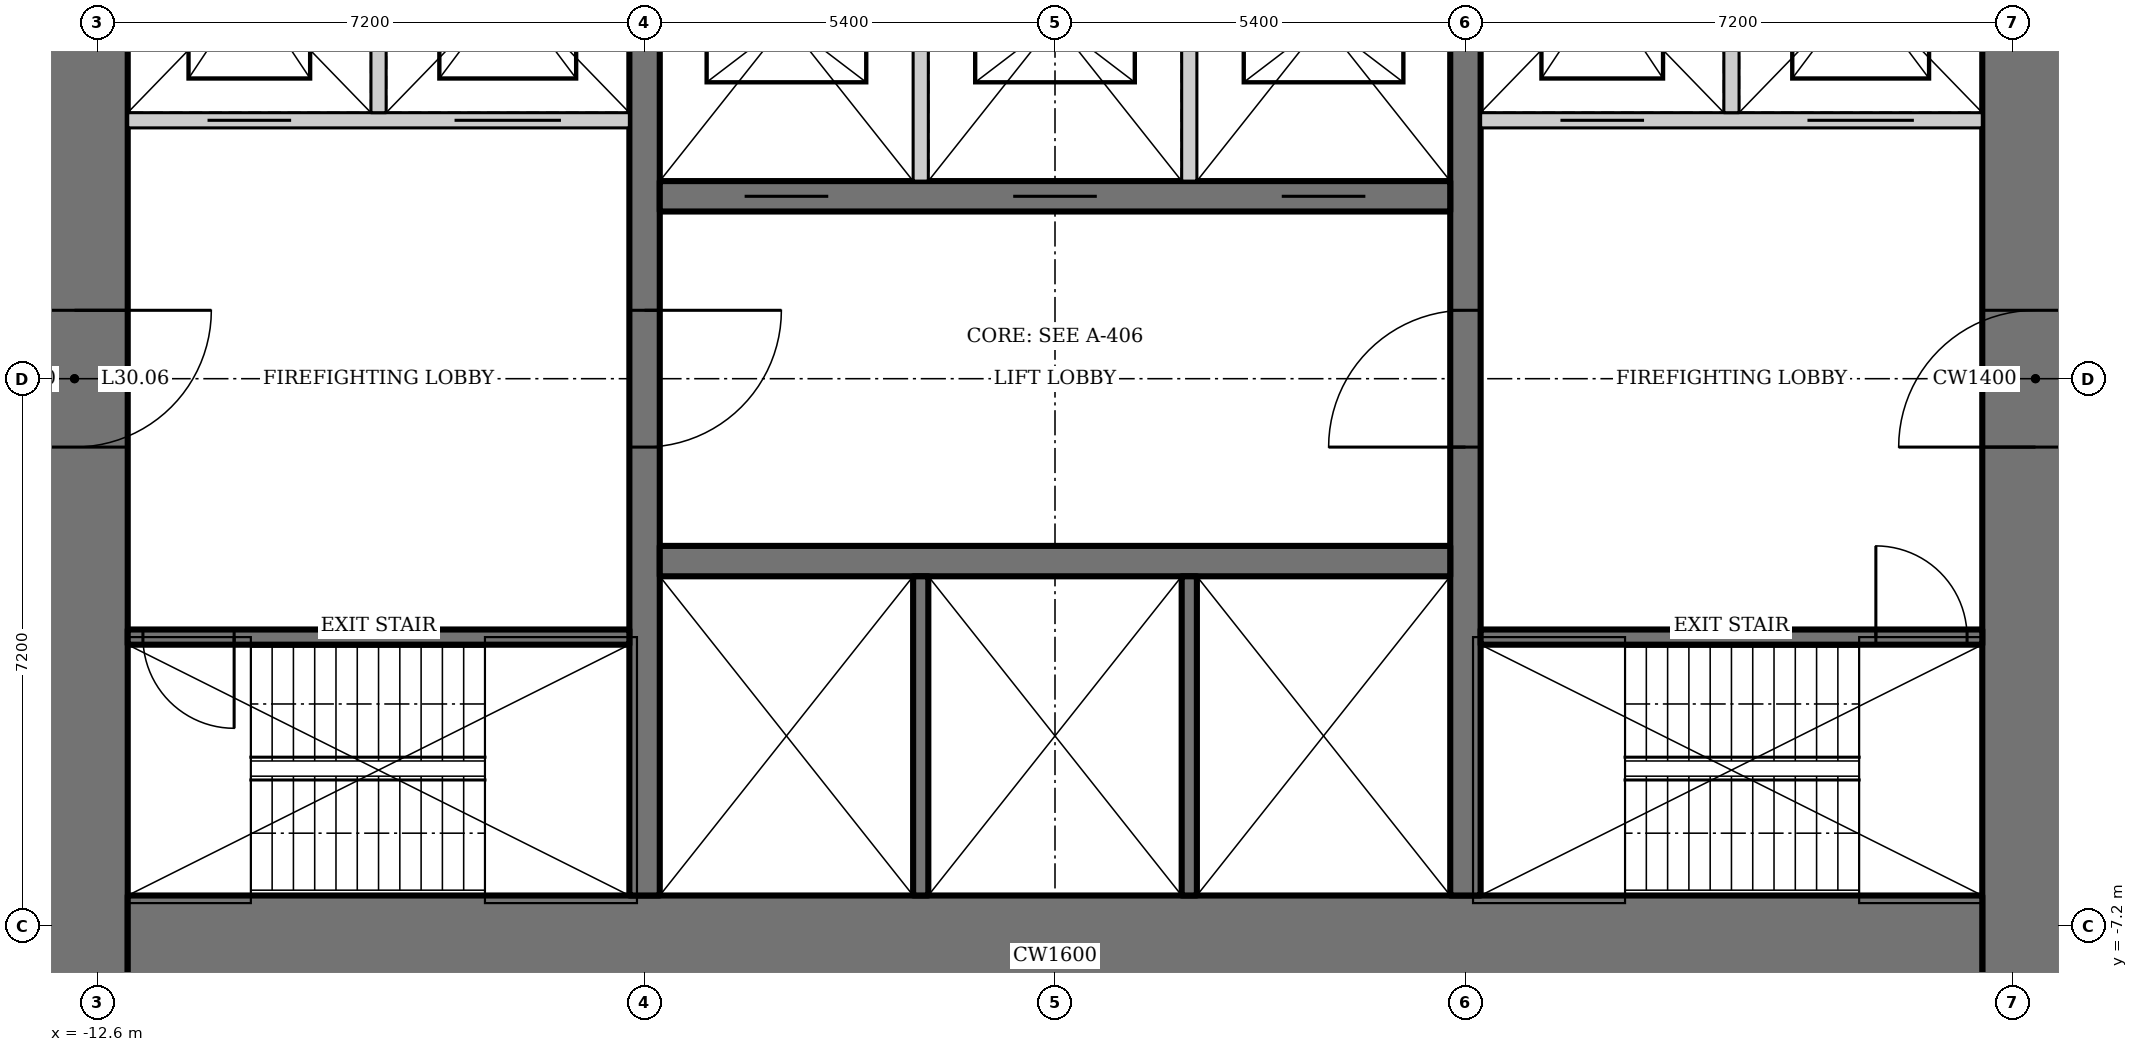
"""IFC4 building model, lengths in metres.
Left out: names, types, materials, properties, quantities, classifications, styles, units other than length and angle.
Written with IfcOpenShell. Run it as: python <this file> out.ifc"""

import sys

from ifc_helpers import new_model, si_unit, direction, frame, frame_2d, origin, place, context, subcontext, project, spatial, rectangle, extrude, element, fill, save


model = new_model("IFC4")
c1 = context("Model", 3, precision=1e-05, world=origin(), true_north=direction((0.0, 1.0)))
c2 = subcontext(c1, "Body", "Model", "MODEL_VIEW")
j1 = project(units=[si_unit("LENGTHUNIT", "METRE"), si_unit("PLANEANGLEUNIT", "RADIAN")], contexts=[c1])
p1 = place(None, origin())
s1 = spatial("IfcSite", under=j1, at=p1, CompositionType="ELEMENT")
p2 = place(p1, origin())
s2 = spatial("IfcBuilding", under=s1, at=p2, CompositionType="ELEMENT")
p3 = place(p2, frame((0.0, 0.0, 130.0)))
s3 = spatial("IfcBuildingStorey", under=s2, at=p3, CompositionType="ELEMENT", Elevation=130.0)
p4 = place(p3, frame((12.9, -13.0, 0.0), z_axis=(0.0, 0.0, 1.0), x_axis=(0.0, 1.0, 0.0)))
e1 = element("IfcWall", 1, at=p4, inside=s3, PredefinedType="SHEAR", context=c2, shape_type="SweptSolid", body=[
    extrude(rectangle(XDim=26.0, YDim=1.4, at=frame_2d((13.0, 0.0))), origin(), (0.0, 0.0, 1.0), 4.2),
])
p5 = place(p4, frame((12.1, 0.0, 0.0)))
e2 = element("IfcOpeningElement", 2, at=p5, cuts=e1, PredefinedType="OPENING", context=c2, shape_type="SweptSolid", body=[
    extrude(rectangle(XDim=1.8, YDim=2.1, at=frame_2d((0.9, 1.05))), frame((0.0, 0.71, 0.0), z_axis=(0.0, -1.0, 0.0), x_axis=(1.0, 0.0, 0.0)), (0.0, 0.0, 1.0), 1.42),
])
p6 = place(p3, frame((-12.9, 13.0, 0.0), z_axis=(0.0, 0.0, 1.0), x_axis=(0.0, -1.0, 0.0)))
e3 = element("IfcWall", 3, at=p6, inside=s3, PredefinedType="SHEAR", context=c2, shape_type="SweptSolid", body=[
    extrude(rectangle(XDim=26.0, YDim=1.4, at=frame_2d((13.0, 0.0))), origin(), (0.0, 0.0, 1.0), 4.2),
])
p7 = place(p6, frame((12.1, 0.0, 0.0)))
e4 = element("IfcOpeningElement", 4, at=p7, cuts=e3, PredefinedType="OPENING", context=c2, shape_type="SweptSolid", body=[
    extrude(rectangle(XDim=1.8, YDim=2.1, at=frame_2d((0.9, 1.05))), frame((0.0, 0.71, 0.0), z_axis=(0.0, -1.0, 0.0), x_axis=(1.0, 0.0, 0.0)), (0.0, 0.0, 1.0), 1.42),
])
p8 = place(p3, frame((-12.2, -7.6, 0.0), z_axis=(0.0, 0.0, 1.0), x_axis=(1.0, 0.0, 0.0)))
e5 = element("IfcWall", 5, at=p8, inside=s3, PredefinedType="SHEAR", context=c2, shape_type="SweptSolid", body=[
    extrude(rectangle(XDim=24.4, YDim=1.6, at=frame_2d((12.2, 0.0))), origin(), (0.0, 0.0, 1.0), 4.2),
])
p9 = place(p3, frame((5.4, -6.8, 0.0), z_axis=(0.0, 0.0, 1.0), x_axis=(0.0, 1.0, 0.0)))
e6 = element("IfcWall", 6, at=p9, inside=s3, PredefinedType="SHEAR", context=c2, shape_type="SweptSolid", body=[
    extrude(rectangle(XDim=13.6, YDim=0.4, at=frame_2d((6.8, 0.0))), origin(), (0.0, 0.0, 1.0), 4.2),
])
p10 = place(p9, frame((5.9, 0.0, 0.0)))
e7 = element("IfcOpeningElement", 7, at=p10, cuts=e6, PredefinedType="OPENING", context=c2, shape_type="SweptSolid", body=[
    extrude(rectangle(XDim=1.8, YDim=2.1, at=frame_2d((0.9, 1.05))), frame((0.0, 0.21, 0.0), z_axis=(0.0, -1.0, 0.0), x_axis=(1.0, 0.0, 0.0)), (0.0, 0.0, 1.0), 0.42),
])
p11 = place(p3, frame((-5.4, 6.8, 0.0), z_axis=(0.0, 0.0, 1.0), x_axis=(0.0, -1.0, 0.0)))
e8 = element("IfcWall", 8, at=p11, inside=s3, PredefinedType="SHEAR", context=c2, shape_type="SweptSolid", body=[
    extrude(rectangle(XDim=13.6, YDim=0.4, at=frame_2d((6.8, 0.0))), origin(), (0.0, 0.0, 1.0), 4.2),
])
p12 = place(p11, frame((5.9, 0.0, 0.0)))
e9 = element("IfcOpeningElement", 9, at=p12, cuts=e8, PredefinedType="OPENING", context=c2, shape_type="SweptSolid", body=[
    extrude(rectangle(XDim=1.8, YDim=2.1, at=frame_2d((0.9, 1.05))), frame((0.0, 0.21, 0.0), z_axis=(0.0, -1.0, 0.0), x_axis=(1.0, 0.0, 0.0)), (0.0, 0.0, 1.0), 0.42),
])
p13 = place(p3, frame((-5.2, -2.4, 0.0), z_axis=(0.0, 0.0, 1.0), x_axis=(1.0, 0.0, 0.0)))
e10 = element("IfcWall", 10, at=p13, inside=s3, PredefinedType="SHEAR", context=c2, shape_type="SweptSolid", body=[
    extrude(rectangle(XDim=10.4, YDim=0.4, at=frame_2d((5.2, 0.0))), origin(), (0.0, 0.0, 1.0), 4.2),
])
for number, where, z_axis, x_axis in (
    (11, (-1.767, -2.6, 0.0), (0.0, 0.0, 1.0), (0.0, -1.0, 0.0)),
    (12, (1.767, -2.6, 0.0), (0.0, 0.0, 1.0), (0.0, -1.0, 0.0)),
):
    element("IfcWall", number, at=place(p3, frame(where, z_axis=z_axis, x_axis=x_axis)), inside=s3, PredefinedType="SOLIDWALL", context=c2, shape_type="SweptSolid", body=[
        extrude(rectangle(XDim=4.2, YDim=0.2, at=frame_2d((2.1, 0.0))), origin(), (0.0, 0.0, 1.0), 4.2),
    ])
p14 = place(p3, frame((5.2, 2.4, 0.0), z_axis=(0.0, 0.0, 1.0), x_axis=(-1.0, 0.0, 0.0)))
e13 = element("IfcWall", 13, at=p14, inside=s3, PredefinedType="SHEAR", context=c2, shape_type="SweptSolid", body=[
    extrude(rectangle(XDim=10.4, YDim=0.4, at=frame_2d((5.2, 0.0))), origin(), (0.0, 0.0, 1.0), 4.2),
])
p15 = place(p14, frame((8.183, 0.0, 0.0)))
e14 = element("IfcOpeningElement", 14, at=p15, cuts=e13, PredefinedType="OPENING", context=c2, shape_type="SweptSolid", body=[
    extrude(rectangle(XDim=1.1, YDim=2.2, at=frame_2d((0.55, 1.1))), frame((0.0, 0.21, 0.0), z_axis=(0.0, -1.0, 0.0), x_axis=(1.0, 0.0, 0.0)), (0.0, 0.0, 1.0), 0.42),
])
p16 = place(p14, frame((4.65, 0.0, 0.0)))
e15 = element("IfcOpeningElement", 15, at=p16, cuts=e13, PredefinedType="OPENING", context=c2, shape_type="SweptSolid", body=[
    extrude(rectangle(XDim=1.1, YDim=2.2, at=frame_2d((0.55, 1.1))), frame((0.0, 0.21, 0.0), z_axis=(0.0, -1.0, 0.0), x_axis=(1.0, 0.0, 0.0)), (0.0, 0.0, 1.0), 0.42),
])
p17 = place(p14, frame((1.117, 0.0, 0.0)))
e16 = element("IfcOpeningElement", 16, at=p17, cuts=e13, PredefinedType="OPENING", context=c2, shape_type="SweptSolid", body=[
    extrude(rectangle(XDim=1.1, YDim=2.2, at=frame_2d((0.55, 1.1))), frame((0.0, 0.21, 0.0), z_axis=(0.0, -1.0, 0.0), x_axis=(1.0, 0.0, 0.0)), (0.0, 0.0, 1.0), 0.42),
])
for number, where, z_axis, x_axis in (
    (17, (-1.767, 2.6, 0.0), (0.0, 0.0, 1.0), (0.0, 1.0, 0.0)),
    (18, (1.767, 2.6, 0.0), (0.0, 0.0, 1.0), (0.0, 1.0, 0.0)),
):
    element("IfcWall", number, at=place(p3, frame(where, z_axis=z_axis, x_axis=x_axis)), inside=s3, PredefinedType="SOLIDWALL", context=c2, shape_type="SweptSolid", body=[
        extrude(rectangle(XDim=4.2, YDim=0.2, at=frame_2d((2.1, 0.0))), origin(), (0.0, 0.0, 1.0), 4.2),
    ])
p18 = place(p3, frame((5.6, -3.4, 0.0), z_axis=(0.0, 0.0, 1.0), x_axis=(1.0, 0.0, 0.0)))
e19 = element("IfcWall", 19, at=p18, inside=s3, PredefinedType="SHEAR", context=c2, shape_type="SweptSolid", body=[
    extrude(rectangle(XDim=6.6, YDim=0.2, at=frame_2d((3.3, 0.0))), origin(), (0.0, 0.0, 1.0), 4.2),
])
p19 = place(p18, frame((5.2, 0.0, 0.0)))
e20 = element("IfcOpeningElement", 20, at=p19, cuts=e19, PredefinedType="OPENING", context=c2, shape_type="SweptSolid", body=[
    extrude(rectangle(XDim=1.2, YDim=2.1, at=frame_2d((0.6, 1.05))), frame((0.0, 0.11, 0.0), z_axis=(0.0, -1.0, 0.0), x_axis=(1.0, 0.0, 0.0)), (0.0, 0.0, 1.0), 0.22),
])
p20 = place(p3, frame((12.2, 3.4, 0.0), z_axis=(0.0, 0.0, 1.0), x_axis=(-1.0, 0.0, 0.0)))
e21 = element("IfcWall", 21, at=p20, inside=s3, PredefinedType="SOLIDWALL", context=c2, shape_type="SweptSolid", body=[
    extrude(rectangle(XDim=6.6, YDim=0.2, at=frame_2d((3.3, 0.0))), origin(), (0.0, 0.0, 1.0), 4.2),
])
p21 = place(p20, frame((4.45, 0.0, 0.0)))
e22 = element("IfcOpeningElement", 22, at=p21, cuts=e21, PredefinedType="OPENING", context=c2, shape_type="SweptSolid", body=[
    extrude(rectangle(XDim=1.1, YDim=2.2, at=frame_2d((0.55, 1.1))), frame((0.0, 0.11, 0.0), z_axis=(0.0, -1.0, 0.0), x_axis=(1.0, 0.0, 0.0)), (0.0, 0.0, 1.0), 0.22),
])
p22 = place(p20, frame((0.9, 0.0, 0.0)))
e23 = element("IfcOpeningElement", 23, at=p22, cuts=e21, PredefinedType="OPENING", context=c2, shape_type="SweptSolid", body=[
    extrude(rectangle(XDim=1.4, YDim=2.2, at=frame_2d((0.7, 1.1))), frame((0.0, 0.11, 0.0), z_axis=(0.0, -1.0, 0.0), x_axis=(1.0, 0.0, 0.0)), (0.0, 0.0, 1.0), 0.22),
])
p23 = place(p3, frame((8.9, 3.5, 0.0), z_axis=(0.0, 0.0, 1.0), x_axis=(0.0, 1.0, 0.0)))
e24 = element("IfcWall", 24, at=p23, inside=s3, PredefinedType="SOLIDWALL", context=c2, shape_type="SweptSolid", body=[
    extrude(rectangle(XDim=3.3, YDim=0.2, at=frame_2d((1.65, 0.0))), origin(), (0.0, 0.0, 1.0), 4.2),
])
p24 = place(p3, frame((-5.6, -3.4, 0.0), z_axis=(0.0, 0.0, 1.0), x_axis=(-1.0, 0.0, 0.0)))
e25 = element("IfcWall", 25, at=p24, inside=s3, PredefinedType="SHEAR", context=c2, shape_type="SweptSolid", body=[
    extrude(rectangle(XDim=6.6, YDim=0.2, at=frame_2d((3.3, 0.0))), origin(), (0.0, 0.0, 1.0), 4.2),
])
p25 = place(p24, frame((5.2, 0.0, 0.0)))
e26 = element("IfcOpeningElement", 26, at=p25, cuts=e25, PredefinedType="OPENING", context=c2, shape_type="SweptSolid", body=[
    extrude(rectangle(XDim=1.2, YDim=2.1, at=frame_2d((0.6, 1.05))), frame((0.0, 0.11, 0.0), z_axis=(0.0, -1.0, 0.0), x_axis=(1.0, 0.0, 0.0)), (0.0, 0.0, 1.0), 0.22),
])
p26 = place(p3, frame((-12.2, 3.4, 0.0), z_axis=(0.0, 0.0, 1.0), x_axis=(1.0, 0.0, 0.0)))
e27 = element("IfcWall", 27, at=p26, inside=s3, PredefinedType="SOLIDWALL", context=c2, shape_type="SweptSolid", body=[
    extrude(rectangle(XDim=6.6, YDim=0.2, at=frame_2d((3.3, 0.0))), origin(), (0.0, 0.0, 1.0), 4.2),
])
p27 = place(p26, frame((1.05, 0.0, 0.0)))
e28 = element("IfcOpeningElement", 28, at=p27, cuts=e27, PredefinedType="OPENING", context=c2, shape_type="SweptSolid", body=[
    extrude(rectangle(XDim=1.1, YDim=2.2, at=frame_2d((0.55, 1.1))), frame((0.0, 0.11, 0.0), z_axis=(0.0, -1.0, 0.0), x_axis=(1.0, 0.0, 0.0)), (0.0, 0.0, 1.0), 0.22),
])
p28 = place(p26, frame((4.3, 0.0, 0.0)))
e29 = element("IfcOpeningElement", 29, at=p28, cuts=e27, PredefinedType="OPENING", context=c2, shape_type="SweptSolid", body=[
    extrude(rectangle(XDim=1.4, YDim=2.2, at=frame_2d((0.7, 1.1))), frame((0.0, 0.11, 0.0), z_axis=(0.0, -1.0, 0.0), x_axis=(1.0, 0.0, 0.0)), (0.0, 0.0, 1.0), 0.22),
])
p29 = place(p3, frame((-8.9, 3.5, 0.0), z_axis=(0.0, 0.0, 1.0), x_axis=(0.0, 1.0, 0.0)))
e30 = element("IfcWall", 30, at=p29, inside=s3, PredefinedType="SOLIDWALL", context=c2, shape_type="SweptSolid", body=[
    extrude(rectangle(XDim=3.3, YDim=0.2, at=frame_2d((1.65, 0.0))), origin(), (0.0, 0.0, 1.0), 4.2),
])
p30 = place(p10, origin())
e31 = element("IfcDoor", 31, at=p30, inside=s3, OperationType="DOUBLE_DOOR_DOUBLE_SWING", PredefinedType="DOOR", context=c2, shape_type="SweptSolid", body=[
    extrude(rectangle(XDim=1.8, YDim=2.1, at=frame_2d((0.9, 1.05))), frame((0.0, 0.025, 0.0), z_axis=(0.0, -1.0, 0.0), x_axis=(1.0, 0.0, 0.0)), (0.0, 0.0, 1.0), 0.05),
])
fill(e7, e31)
p31 = place(p12, origin())
e32 = element("IfcDoor", 32, at=p31, inside=s3, OperationType="DOUBLE_DOOR_DOUBLE_SWING", PredefinedType="DOOR", context=c2, shape_type="SweptSolid", body=[
    extrude(rectangle(XDim=1.8, YDim=2.1, at=frame_2d((0.9, 1.05))), frame((0.0, 0.025, 0.0), z_axis=(0.0, -1.0, 0.0), x_axis=(1.0, 0.0, 0.0)), (0.0, 0.0, 1.0), 0.05),
])
fill(e9, e32)
p32 = place(p19, origin())
e33 = element("IfcDoor", 33, at=p32, inside=s3, OperationType="SINGLE_SWING_RIGHT", PredefinedType="DOOR", context=c2, shape_type="SweptSolid", body=[
    extrude(rectangle(XDim=1.2, YDim=2.1, at=frame_2d((0.6, 1.05))), frame((0.0, 0.025, 0.0), z_axis=(0.0, -1.0, 0.0), x_axis=(1.0, 0.0, 0.0)), (0.0, 0.0, 1.0), 0.05),
])
fill(e20, e33)
p33 = place(p25, origin())
e34 = element("IfcDoor", 34, at=p33, inside=s3, OperationType="SINGLE_SWING_RIGHT", PredefinedType="DOOR", context=c2, shape_type="SweptSolid", body=[
    extrude(rectangle(XDim=1.2, YDim=2.1, at=frame_2d((0.6, 1.05))), frame((0.0, 0.025, 0.0), z_axis=(0.0, -1.0, 0.0), x_axis=(1.0, 0.0, 0.0)), (0.0, 0.0, 1.0), 0.05),
])
fill(e26, e34)
p34 = place(p5, origin())
e35 = element("IfcDoor", 35, at=p34, inside=s3, OperationType="DOUBLE_DOOR_DOUBLE_SWING", PredefinedType="DOOR", context=c2, shape_type="SweptSolid", body=[
    extrude(rectangle(XDim=1.8, YDim=2.1, at=frame_2d((0.9, 1.05))), frame((0.0, 0.025, 0.0), z_axis=(0.0, -1.0, 0.0), x_axis=(1.0, 0.0, 0.0)), (0.0, 0.0, 1.0), 0.05),
])
fill(e2, e35)
p35 = place(p7, origin())
e36 = element("IfcDoor", 36, at=p35, inside=s3, OperationType="DOUBLE_DOOR_DOUBLE_SWING", PredefinedType="DOOR", context=c2, shape_type="SweptSolid", body=[
    extrude(rectangle(XDim=1.8, YDim=2.1, at=frame_2d((0.9, 1.05))), frame((0.0, 0.025, 0.0), z_axis=(0.0, -1.0, 0.0), x_axis=(1.0, 0.0, 0.0)), (0.0, 0.0, 1.0), 0.05),
])
fill(e4, e36)
p36 = place(p15, origin())
e37 = element("IfcDoor", 37, at=p36, inside=s3, OperationType="DOUBLE_DOOR_SLIDING", PredefinedType="DOOR", context=c2, shape_type="SweptSolid", body=[
    extrude(rectangle(XDim=1.1, YDim=2.2, at=frame_2d((0.55, 1.1))), frame((0.0, 0.025, 0.0), z_axis=(0.0, -1.0, 0.0), x_axis=(1.0, 0.0, 0.0)), (0.0, 0.0, 1.0), 0.05),
])
fill(e14, e37)
p37 = place(p16, origin())
e38 = element("IfcDoor", 38, at=p37, inside=s3, OperationType="DOUBLE_DOOR_SLIDING", PredefinedType="DOOR", context=c2, shape_type="SweptSolid", body=[
    extrude(rectangle(XDim=1.1, YDim=2.2, at=frame_2d((0.55, 1.1))), frame((0.0, 0.025, 0.0), z_axis=(0.0, -1.0, 0.0), x_axis=(1.0, 0.0, 0.0)), (0.0, 0.0, 1.0), 0.05),
])
fill(e15, e38)
p38 = place(p17, origin())
e39 = element("IfcDoor", 39, at=p38, inside=s3, OperationType="DOUBLE_DOOR_SLIDING", PredefinedType="DOOR", context=c2, shape_type="SweptSolid", body=[
    extrude(rectangle(XDim=1.1, YDim=2.2, at=frame_2d((0.55, 1.1))), frame((0.0, 0.025, 0.0), z_axis=(0.0, -1.0, 0.0), x_axis=(1.0, 0.0, 0.0)), (0.0, 0.0, 1.0), 0.05),
])
fill(e16, e39)
p39 = place(p27, origin())
e40 = element("IfcDoor", 40, at=p39, inside=s3, OperationType="DOUBLE_DOOR_SLIDING", PredefinedType="DOOR", context=c2, shape_type="SweptSolid", body=[
    extrude(rectangle(XDim=1.1, YDim=2.2, at=frame_2d((0.55, 1.1))), frame((0.0, 0.025, 0.0), z_axis=(0.0, -1.0, 0.0), x_axis=(1.0, 0.0, 0.0)), (0.0, 0.0, 1.0), 0.05),
])
fill(e28, e40)
p40 = place(p28, origin())
e41 = element("IfcDoor", 41, at=p40, inside=s3, OperationType="DOUBLE_DOOR_SLIDING", PredefinedType="DOOR", context=c2, shape_type="SweptSolid", body=[
    extrude(rectangle(XDim=1.4, YDim=2.2, at=frame_2d((0.7, 1.1))), frame((0.0, 0.025, 0.0), z_axis=(0.0, -1.0, 0.0), x_axis=(1.0, 0.0, 0.0)), (0.0, 0.0, 1.0), 0.05),
])
fill(e29, e41)
p41 = place(p21, origin())
e42 = element("IfcDoor", 42, at=p41, inside=s3, OperationType="DOUBLE_DOOR_SLIDING", PredefinedType="DOOR", context=c2, shape_type="SweptSolid", body=[
    extrude(rectangle(XDim=1.1, YDim=2.2, at=frame_2d((0.55, 1.1))), frame((0.0, 0.025, 0.0), z_axis=(0.0, -1.0, 0.0), x_axis=(1.0, 0.0, 0.0)), (0.0, 0.0, 1.0), 0.05),
])
fill(e22, e42)
p42 = place(p22, origin())
e43 = element("IfcDoor", 43, at=p42, inside=s3, OperationType="DOUBLE_DOOR_SLIDING", PredefinedType="DOOR", context=c2, shape_type="SweptSolid", body=[
    extrude(rectangle(XDim=1.4, YDim=2.2, at=frame_2d((0.7, 1.1))), frame((0.0, 0.025, 0.0), z_axis=(0.0, -1.0, 0.0), x_axis=(1.0, 0.0, 0.0)), (0.0, 0.0, 1.0), 0.05),
])
fill(e23, e43)
save(model, sys.argv[1])
